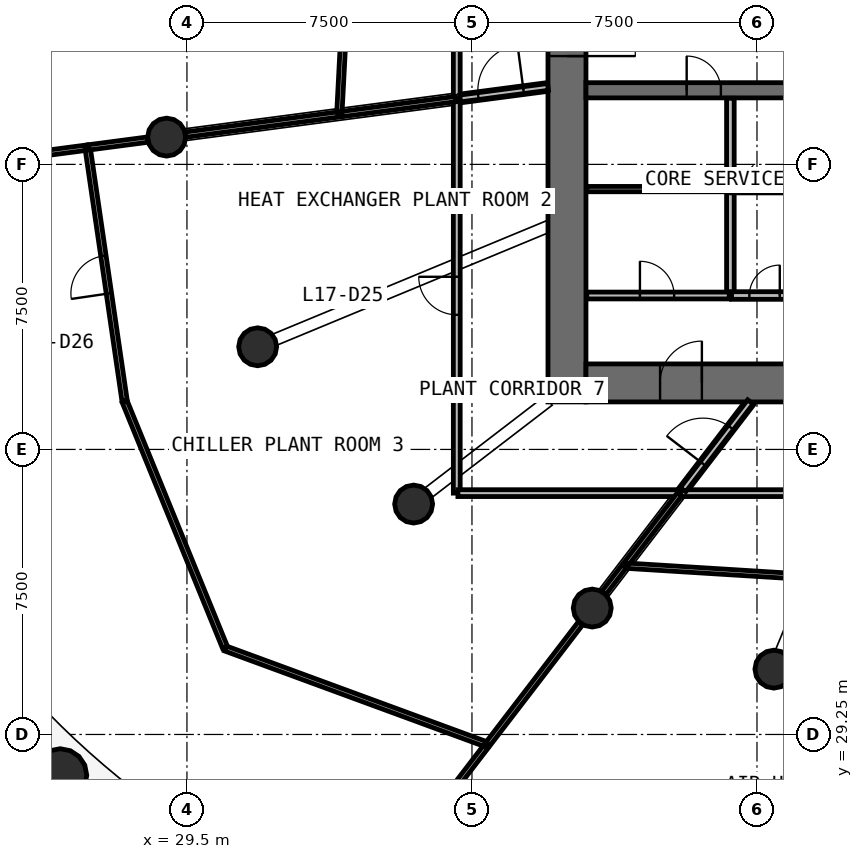
"""IFC4 building model, lengths in metres.
Left out: names, types, materials, properties, quantities, classifications, styles, units other than length and angle.
Written with IfcOpenShell. Run it as: python <this file> out.ifc"""

import sys

from ifc_helpers import new_model, si_unit, direction, frame, frame_2d, origin, origin_2d, place, context, subcontext, project, spatial, rectangle, circle, extrude, source, transform, mapped, element, fill, save


model = new_model("IFC4")
c1 = context("Model", 3, precision=1e-05, world=origin(), true_north=direction((0.0, 1.0)))
c2 = subcontext(c1, "Body", "Model", "MODEL_VIEW")
j1 = project(units=[si_unit("LENGTHUNIT", "METRE"), si_unit("PLANEANGLEUNIT", "RADIAN")], contexts=[c1])
p1 = place(None, origin())
s1 = spatial("IfcSite", under=j1, at=p1, CompositionType="ELEMENT")
p2 = place(p1, origin())
s2 = spatial("IfcBuilding", under=s1, at=p2, CompositionType="ELEMENT")
p3 = place(p2, frame((0.0, 0.0, 75.4)))
s3 = spatial("IfcBuildingStorey", under=s2, at=p3, CompositionType="ELEMENT", Elevation=75.4)
p4 = place(p3, frame((39.5, 58.0, 0.0), z_axis=(0.0, 0.0, 1.0), x_axis=(0.0, -1.0, 0.0)))
e1 = element("IfcWall", 1, at=p4, inside=s3, PredefinedType="SHEAR", context=c2, shape_type="SweptSolid", body=[
    extrude(rectangle(XDim=20.0, YDim=1.0, at=frame_2d((10.0, 0.0))), origin(), (0.0, 0.0, 1.0), 4.4),
])
p5 = place(p4, frame((9.1, 0.0, 0.0)))
e2 = element("IfcOpeningElement", 2, at=p5, cuts=e1, PredefinedType="OPENING", context=c2, shape_type="SweptSolid", body=[
    extrude(rectangle(XDim=1.8, YDim=2.1, at=frame_2d((0.9, 1.05))), frame((0.0, 0.51, 0.0), z_axis=(0.0, -1.0, 0.0), x_axis=(1.0, 0.0, 0.0)), (0.0, 0.0, 1.0), 1.02),
])
p6 = place(p3, frame((40.0, 38.5, 0.0), z_axis=(0.0, 0.0, 1.0), x_axis=(1.0, 0.0, 0.0)))
e3 = element("IfcWall", 3, at=p6, inside=s3, PredefinedType="SHEAR", context=c2, shape_type="SweptSolid", body=[
    extrude(rectangle(XDim=24.0, YDim=1.0, at=frame_2d((12.0, 0.0))), origin(), (0.0, 0.0, 1.0), 4.4),
])
p7 = place(p6, frame((21.45, 0.0, 0.0)))
e4 = element("IfcOpeningElement", 4, at=p7, cuts=e3, PredefinedType="OPENING", context=c2, shape_type="SweptSolid", body=[
    extrude(rectangle(XDim=1.1, YDim=2.1, at=frame_2d((0.55, 1.05))), frame((0.0, 0.51, 0.0), z_axis=(0.0, -1.0, 0.0), x_axis=(1.0, 0.0, 0.0)), (0.0, 0.0, 1.0), 1.02),
])
p8 = place(p6, frame((1.95, 0.0, 0.0)))
e5 = element("IfcOpeningElement", 5, at=p8, cuts=e3, PredefinedType="OPENING", context=c2, shape_type="SweptSolid", body=[
    extrude(rectangle(XDim=1.1, YDim=2.1, at=frame_2d((0.55, 1.05))), frame((0.0, 0.51, 0.0), z_axis=(0.0, -1.0, 0.0), x_axis=(1.0, 0.0, 0.0)), (0.0, 0.0, 1.0), 1.02),
])
p9 = place(p3, frame((40.0, 46.2, 0.0), z_axis=(0.0, 0.0, 1.0), x_axis=(1.0, 0.0, 0.0)))
e6 = element("IfcWall", 6, at=p9, inside=s3, PredefinedType="SHEAR", context=c2, shape_type="SweptSolid", body=[
    extrude(rectangle(XDim=24.0, YDim=0.4, at=frame_2d((12.0, 0.0))), origin(), (0.0, 0.0, 1.0), 4.4),
])
p10 = place(p9, frame((20.45, 0.0, 0.0)))
e7 = element("IfcOpeningElement", 7, at=p10, cuts=e6, PredefinedType="OPENING", context=c2, shape_type="SweptSolid", body=[
    extrude(rectangle(XDim=0.9, YDim=2.1, at=frame_2d((0.45, 1.05))), frame((0.0, 0.21, 0.0), z_axis=(0.0, -1.0, 0.0), x_axis=(1.0, 0.0, 0.0)), (0.0, 0.0, 1.0), 0.42),
])
p11 = place(p9, frame((2.65, 0.0, 0.0)))
e8 = element("IfcOpeningElement", 8, at=p11, cuts=e6, PredefinedType="OPENING", context=c2, shape_type="SweptSolid", body=[
    extrude(rectangle(XDim=0.9, YDim=2.1, at=frame_2d((0.45, 1.05))), frame((0.0, 0.21, 0.0), z_axis=(0.0, -1.0, 0.0), x_axis=(1.0, 0.0, 0.0)), (0.0, 0.0, 1.0), 0.42),
])
p12 = place(p9, frame((11.65, 0.0, 0.0)))
e9 = element("IfcOpeningElement", 9, at=p12, cuts=e6, PredefinedType="OPENING", context=c2, shape_type="SweptSolid", body=[
    extrude(rectangle(XDim=0.9, YDim=2.1, at=frame_2d((0.45, 1.05))), frame((0.0, 0.21, 0.0), z_axis=(0.0, -1.0, 0.0), x_axis=(1.0, 0.0, 0.0)), (0.0, 0.0, 1.0), 0.42),
])
m1 = source(origin(), c2, "Body", "SweptSolid", [
    extrude(circle(Radius=0.7, at=origin_2d()), origin(), (0.0, 0.0, 1.0), 4.0),
])
p13 = place(p3, frame((26.164, 28.176, 0.0), z_axis=(0.0, 0.0, 1.0), x_axis=(1.0, 0.0, 0.0)))
e10 = element("IfcColumn", 10, at=p13, inside=s3, PredefinedType="COLUMN", context=c2, shape_type="MappedRepresentation", body=[
    mapped(m1, transform((0.0, 0.0, 0.0), scale=1.0)),
])
m2 = source(origin(), c2, "Body", "SweptSolid", [
    extrude(circle(Radius=0.5, at=origin_2d()), origin(), (0.0, 0.0, 1.0), 4.4),
])
for number, where, z_axis, x_axis in (
    (11, (28.966, 44.968, 0.0), (0.0, 0.0, 1.0), (1.0, 0.0, 0.0)),
    (12, (31.361, 39.451, 0.0), (0.0, 0.0, 1.0), (1.0, 0.0, 0.0)),
    (13, (35.465, 35.312, 0.0), (0.0, 0.0, 1.0), (1.0, 0.0, 0.0)),
    (14, (40.165, 32.576, 0.0), (0.0, 0.0, 1.0), (1.0, 0.0, 0.0)),
    (15, (44.945, 30.969, 0.0), (0.0, 0.0, 1.0), (1.0, 0.0, 0.0)),
):
    element("IfcColumn", number, at=place(p3, frame(where, z_axis=z_axis, x_axis=x_axis)), inside=s3, PredefinedType="COLUMN", context=c2, shape_type="MappedRepresentation", body=[
        mapped(m2, transform((0.0, 0.0, 0.0), scale=1.0)),
    ])
p14 = place(p3, frame((43.8, 43.6, 0.0), z_axis=(0.0, 0.0, 1.0), x_axis=(0.0, -1.0, 0.0)))
e16 = element("IfcWall", 16, at=p14, inside=s3, PredefinedType="SOLIDWALL", context=c2, shape_type="SweptSolid", body=[
    extrude(rectangle(XDim=2.8, YDim=0.2, at=frame_2d((1.4, 0.0))), origin(), (0.0, 0.0, 1.0), 4.0),
])
p15 = place(p3, frame((43.8, 45.99, 0.0), z_axis=(0.0, 0.0, 1.0), x_axis=(0.0, -1.0, 0.0)))
e17 = element("IfcWall", 17, at=p15, inside=s3, PredefinedType="SOLIDWALL", context=c2, shape_type="SweptSolid", body=[
    extrude(rectangle(XDim=2.36, YDim=0.2, at=frame_2d((1.18, 0.0))), origin(), (0.0, 0.0, 1.0), 4.0),
])
p16 = place(p3, frame((43.83, 43.6, 0.0), z_axis=(0.0, 0.0, 1.0), x_axis=(1.0, 0.0, 0.0)))
e18 = element("IfcWall", 18, at=p16, inside=s3, PredefinedType="SOLIDWALL", context=c2, shape_type="SweptSolid", body=[
    extrude(rectangle(XDim=1.64, YDim=0.2, at=frame_2d((0.82, 0.0))), origin(), (0.0, 0.0, 1.0), 4.0),
])
p17 = place(p3, frame((43.83, 40.8, 0.0), z_axis=(0.0, 0.0, 1.0), x_axis=(1.0, 0.0, 0.0)))
e19 = element("IfcWall", 19, at=p17, inside=s3, PredefinedType="SOLIDWALL", context=c2, shape_type="SweptSolid", body=[
    extrude(rectangle(XDim=1.64, YDim=0.2, at=frame_2d((0.82, 0.0))), origin(), (0.0, 0.0, 1.0), 4.0),
])
p18 = place(p17, frame((0.47, 0.0, 0.0)))
e20 = element("IfcOpeningElement", 20, at=p18, cuts=e19, PredefinedType="OPENING", context=c2, shape_type="SweptSolid", body=[
    extrude(rectangle(XDim=0.8, YDim=2.1, at=frame_2d((0.4, 1.05))), frame((0.0, 0.11, 0.0), z_axis=(0.0, -1.0, 0.0), x_axis=(1.0, 0.0, 0.0)), (0.0, 0.0, 1.0), 0.22),
])
p19 = place(p3, frame((36.6, 45.973, 0.0), z_axis=(0.0, 0.0, 1.0), x_axis=(0.0, 1.0, 0.0)))
e21 = element("IfcWall", 21, at=p19, inside=s3, PredefinedType="PARTITIONING", context=c2, shape_type="SweptSolid", body=[
    extrude(rectangle(XDim=13.24, YDim=0.18, at=frame_2d((6.62, 0.0))), origin(), (0.0, 0.0, 1.0), 2.8),
])
p20 = place(p19, frame((6.19, 0.0, 0.0)))
e22 = element("IfcOpeningElement", 22, at=p20, cuts=e21, PredefinedType="OPENING", context=c2, shape_type="SweptSolid", body=[
    extrude(rectangle(XDim=1.0, YDim=2.1, at=frame_2d((0.5, 1.05))), frame((0.0, 0.1, 0.0), z_axis=(0.0, -1.0, 0.0), x_axis=(1.0, 0.0, 0.0)), (0.0, 0.0, 1.0), 0.2),
])
p21 = place(p3, frame((53.603, 35.6, 0.0), z_axis=(0.0, 0.0, 1.0), x_axis=(-1.0, 0.0, 0.0)))
e23 = element("IfcWall", 23, at=p21, inside=s3, PredefinedType="PARTITIONING", context=c2, shape_type="SweptSolid", body=[
    extrude(rectangle(XDim=11.117, YDim=0.18, at=frame_2d((5.559, 0.0))), origin(), (0.0, 0.0, 1.0), 2.8),
])
p22 = place(p21, frame((5.067, 0.0, 0.0)))
e24 = element("IfcOpeningElement", 24, at=p22, cuts=e23, PredefinedType="OPENING", context=c2, shape_type="SweptSolid", body=[
    extrude(rectangle(XDim=1.0, YDim=2.1, at=frame_2d((0.5, 1.05))), frame((0.0, 0.1, 0.0), z_axis=(0.0, -1.0, 0.0), x_axis=(1.0, 0.0, 0.0)), (0.0, 0.0, 1.0), 0.2),
])
p23 = place(p3, frame((36.6, 35.6, 0.0), z_axis=(0.0, 0.0, 1.0), x_axis=(0.0, 1.0, 0.0)))
e25 = element("IfcWall", 25, at=p23, inside=s3, PredefinedType="PARTITIONING", context=c2, shape_type="SweptSolid", body=[
    extrude(rectangle(XDim=10.343, YDim=0.18, at=frame_2d((5.171, 0.0))), origin(), (0.0, 0.0, 1.0), 2.8),
])
p24 = place(p23, frame((4.693, 0.0, 0.0)))
e26 = element("IfcOpeningElement", 26, at=p24, cuts=e25, PredefinedType="OPENING", context=c2, shape_type="SweptSolid", body=[
    extrude(rectangle(XDim=1.0, YDim=2.1, at=frame_2d((0.5, 1.05))), frame((0.0, 0.1, 0.0), z_axis=(0.0, -1.0, 0.0), x_axis=(1.0, 0.0, 0.0)), (0.0, 0.0, 1.0), 0.2),
])
p25 = place(p3, frame((36.63, 35.6, 0.0), z_axis=(0.0, 0.0, 1.0), x_axis=(1.0, 0.0, 0.0)))
e27 = element("IfcWall", 27, at=p25, inside=s3, PredefinedType="PARTITIONING", context=c2, shape_type="SweptSolid", body=[
    extrude(rectangle(XDim=5.825, YDim=0.18, at=frame_2d((2.913, 0.0))), origin(), (0.0, 0.0, 1.0), 2.8),
])
p26 = place(p3, frame((40.02, 40.8, 0.0), z_axis=(0.0, 0.0, 1.0), x_axis=(1.0, 0.0, 0.0)))
e28 = element("IfcWall", 28, at=p26, inside=s3, PredefinedType="PARTITIONING", context=c2, shape_type="SweptSolid", body=[
    extrude(rectangle(XDim=3.75, YDim=0.18, at=frame_2d((1.875, 0.0))), origin(), (0.0, 0.0, 1.0), 4.0),
])
p27 = place(p26, frame((1.4, 0.0, 0.0)))
e29 = element("IfcOpeningElement", 29, at=p27, cuts=e28, PredefinedType="OPENING", context=c2, shape_type="SweptSolid", body=[
    extrude(rectangle(XDim=0.9, YDim=2.1, at=frame_2d((0.45, 1.05))), frame((0.0, 0.1, 0.0), z_axis=(0.0, -1.0, 0.0), x_axis=(1.0, 0.0, 0.0)), (0.0, 0.0, 1.0), 0.2),
])
p28 = place(p3, frame((42.554, 35.69, 0.0), z_axis=(0.0, 0.0, 1.0), x_axis=(0.608737787706, 0.793371480341, 0.0)))
e30 = element("IfcWall", 30, at=p28, inside=s3, PredefinedType="PARTITIONING", context=c2, shape_type="SweptSolid", body=[
    extrude(rectangle(XDim=2.912, YDim=0.18, at=frame_2d((1.456, 0.0))), origin(), (0.0, 0.0, 1.0), 2.8),
])
p29 = place(p28, frame((0.862, 0.0, 0.0)))
e31 = element("IfcOpeningElement", 31, at=p29, cuts=e30, PredefinedType="OPENING", context=c2, shape_type="SweptSolid", body=[
    extrude(rectangle(XDim=1.2, YDim=2.1, at=frame_2d((0.6, 1.05))), frame((0.0, 0.1, 0.0), z_axis=(0.0, -1.0, 0.0), x_axis=(1.0, 0.0, 0.0)), (0.0, 0.0, 1.0), 0.2),
])
p30 = place(p3, frame((36.69, 45.984, 0.0), z_axis=(0.0, 0.0, 1.0), x_axis=(0.991440737811, 0.130557509967, 0.0)))
e32 = element("IfcWall", 32, at=p30, inside=s3, PredefinedType="PARTITIONING", context=c2, shape_type="SweptSolid", body=[
    extrude(rectangle(XDim=2.33, YDim=0.18, at=frame_2d((1.165, 0.0))), origin(), (0.0, 0.0, 1.0), 2.8),
])
p31 = place(p30, frame((0.48, 0.0, 0.0)))
e33 = element("IfcOpeningElement", 33, at=p31, cuts=e32, PredefinedType="OPENING", context=c2, shape_type="SweptSolid", body=[
    extrude(rectangle(XDim=1.2, YDim=2.1, at=frame_2d((0.6, 1.05))), frame((0.0, 0.1, 0.0), z_axis=(0.0, -1.0, 0.0), x_axis=(1.0, 0.0, 0.0)), (0.0, 0.0, 1.0), 0.2),
])
p32 = place(p3, frame((26.885, 44.694, 0.0), z_axis=(0.0, 0.0, 1.0), x_axis=(-0.991445064554, -0.130524648905, 0.0)))
e34 = element("IfcWall", 34, at=p32, inside=s3, PredefinedType="PARTITIONING", context=c2, shape_type="SweptSolid", body=[
    extrude(rectangle(XDim=10.265, YDim=0.14, at=frame_2d((5.133, 0.0))), origin(), (0.0, 0.0, 1.0), 2.8),
])
p33 = place(p3, frame((30.513, 31.513, 0.0), z_axis=(0.0, 0.0, 1.0), x_axis=(0.938632857677, -0.344917901085, 0.0)))
e35 = element("IfcWall", 35, at=p33, inside=s3, PredefinedType="PARTITIONING", context=c2, shape_type="SweptSolid", body=[
    extrude(rectangle(XDim=7.343, YDim=0.14, at=frame_2d((3.671, 0.0))), origin(), (0.0, 0.0, 1.0), 2.8),
])
p34 = place(p3, frame((27.864, 38.002, 0.0), z_axis=(0.0, 0.0, 1.0), x_axis=(0.377966751533, -0.925819169566, 0.0)))
e36 = element("IfcWall", 36, at=p34, inside=s3, PredefinedType="PARTITIONING", context=c2, shape_type="SweptSolid", body=[
    extrude(rectangle(XDim=6.98, YDim=0.14, at=frame_2d((3.49, 0.0))), origin(), (0.0, 0.0, 1.0), 2.8),
])
p35 = place(p3, frame((27.859, 38.032, 0.0), z_axis=(0.0, 0.0, 1.0), x_axis=(-0.144720027083, 0.989472644271, 0.0)))
e37 = element("IfcWall", 37, at=p35, inside=s3, PredefinedType="PARTITIONING", context=c2, shape_type="SweptSolid", body=[
    extrude(rectangle(XDim=6.702, YDim=0.14, at=frame_2d((3.351, 0.0))), origin(), (0.0, 0.0, 1.0), 2.8),
])
p36 = place(p35, frame((2.852, 0.0, 0.0)))
e38 = element("IfcOpeningElement", 38, at=p36, cuts=e37, PredefinedType="OPENING", context=c2, shape_type="SweptSolid", body=[
    extrude(rectangle(XDim=1.0, YDim=2.1, at=frame_2d((0.5, 1.05))), frame((0.0, 0.08, 0.0), z_axis=(0.0, -1.0, 0.0), x_axis=(1.0, 0.0, 0.0)), (0.0, 0.0, 1.0), 0.16),
])
p37 = place(p3, frame((37.361, 28.922, 0.0), z_axis=(0.0, 0.0, 1.0), x_axis=(-0.608768603858, -0.793347834784, 0.0)))
e39 = element("IfcWall", 39, at=p37, inside=s3, PredefinedType="PARTITIONING", context=c2, shape_type="SweptSolid", body=[
    extrude(rectangle(XDim=5.625, YDim=0.14, at=frame_2d((2.813, 0.0))), origin(), (0.0, 0.0, 1.0), 2.8),
])
p38 = place(p3, frame((41.022, 33.694, 0.0), z_axis=(0.0, 0.0, 1.0), x_axis=(0.998082686061, -0.061894683005, 0.0)))
e40 = element("IfcWall", 40, at=p38, inside=s3, PredefinedType="PARTITIONING", context=c2, shape_type="SweptSolid", body=[
    extrude(rectangle(XDim=4.935, YDim=0.14, at=frame_2d((2.467, 0.0))), origin(), (0.0, 0.0, 1.0), 2.8),
])
p39 = place(p3, frame((33.509, 45.566, 0.0), z_axis=(0.0, 0.0, 1.0), x_axis=(0.052002293209, 0.998646965399, 0.0)))
e41 = element("IfcWall", 41, at=p39, inside=s3, PredefinedType="PARTITIONING", context=c2, shape_type="SweptSolid", body=[
    extrude(rectangle(XDim=4.812, YDim=0.14, at=frame_2d((2.406, 0.0))), origin(), (0.0, 0.0, 1.0), 2.8),
])
p40 = place(p39, frame((1.962, 0.0, 0.0)))
e42 = element("IfcOpeningElement", 42, at=p40, cuts=e41, PredefinedType="OPENING", context=c2, shape_type="SweptSolid", body=[
    extrude(rectangle(XDim=1.0, YDim=2.1, at=frame_2d((0.5, 1.05))), frame((0.0, 0.08, 0.0), z_axis=(0.0, -1.0, 0.0), x_axis=(1.0, 0.0, 0.0)), (0.0, 0.0, 1.0), 0.16),
])
p41 = place(p3, frame((33.479, 45.562, 0.0), z_axis=(0.0, 0.0, 1.0), x_axis=(-0.991444643615, -0.130527846248, 0.0)))
e43 = element("IfcWall", 43, at=p41, inside=s3, PredefinedType="PARTITIONING", context=c2, shape_type="SweptSolid", body=[
    extrude(rectangle(XDim=4.048, YDim=0.14, at=frame_2d((2.024, 0.0))), origin(), (0.0, 0.0, 1.0), 2.8),
])
p42 = place(p3, frame((39.858, 32.176, 0.0), z_axis=(0.0, 0.0, 1.0), x_axis=(-0.608766057901, -0.793349788396, 0.0)))
e44 = element("IfcWall", 44, at=p42, inside=s3, PredefinedType="PARTITIONING", context=c2, shape_type="SweptSolid", body=[
    extrude(rectangle(XDim=3.998, YDim=0.14, at=frame_2d((1.999, 0.0))), origin(), (0.0, 0.0, 1.0), 2.8),
])
p43 = place(p3, frame((43.77, 43.6, 0.0), z_axis=(0.0, 0.0, 1.0), x_axis=(-1.0, 0.0, 0.0)))
e45 = element("IfcWall", 45, at=p43, inside=s3, PredefinedType="PARTITIONING", context=c2, shape_type="SweptSolid", body=[
    extrude(rectangle(XDim=3.75, YDim=0.14, at=frame_2d((1.875, 0.0))), origin(), (0.0, 0.0, 1.0), 3.1),
])
p44 = place(p3, frame((36.57, 45.969, 0.0), z_axis=(0.0, 0.0, 1.0), x_axis=(-0.991452642606, -0.130467074276, 0.0)))
e46 = element("IfcWall", 46, at=p44, inside=s3, PredefinedType="PARTITIONING", context=c2, shape_type="SweptSolid", body=[
    extrude(rectangle(XDim=3.017, YDim=0.14, at=frame_2d((1.508, 0.0))), origin(), (0.0, 0.0, 1.0), 2.8),
])
p45 = place(p3, frame((42.463, 35.571, 0.0), z_axis=(0.0, 0.0, 1.0), x_axis=(-0.608779636854, -0.793339368589, 0.0)))
e47 = element("IfcWall", 47, at=p45, inside=s3, PredefinedType="PARTITIONING", context=c2, shape_type="SweptSolid", body=[
    extrude(rectangle(XDim=2.282, YDim=0.14, at=frame_2d((1.141, 0.0))), origin(), (0.0, 0.0, 1.0), 2.8),
])
p46 = place(p3, frame((28.466, 44.902, 0.0), z_axis=(0.0, 0.0, 1.0), x_axis=(-0.991455357704, -0.130446439887, 0.0)))
e48 = element("IfcWall", 48, at=p46, inside=s3, PredefinedType="PARTITIONING", context=c2, shape_type="SweptSolid", body=[
    extrude(rectangle(XDim=1.565, YDim=0.14, at=frame_2d((0.782, 0.0))), origin(), (0.0, 0.0, 1.0), 2.8),
])
p47 = place(p3, frame((41.004, 33.67, 0.0), z_axis=(0.0, 0.0, 1.0), x_axis=(-0.60876565208, -0.793350099797, 0.0)))
e49 = element("IfcWall", 49, at=p47, inside=s3, PredefinedType="PARTITIONING", context=c2, shape_type="SweptSolid", body=[
    extrude(rectangle(XDim=0.874, YDim=0.14, at=frame_2d((0.437, 0.0))), origin(), (0.0, 0.0, 1.0), 2.8),
])
m3 = source(origin(), c2, "Body", "SweptSolid", [
    extrude(rectangle(XDim=1.8, YDim=2.1, at=frame_2d((0.9, 1.05))), frame((0.0, 0.025, 0.0), z_axis=(0.0, -1.0, 0.0), x_axis=(1.0, 0.0, 0.0)), (0.0, 0.0, 1.0), 0.05),
])
p48 = place(p5, origin())
e50 = element("IfcDoor", 50, at=p48, inside=s3, OperationType="SINGLE_SWING_RIGHT", PredefinedType="DOOR", context=c2, shape_type="MappedRepresentation", body=[
    mapped(m3, transform((0.0, 0.0, 0.0), scale=1.0)),
])
fill(e2, e50)
m4 = source(origin(), c2, "Body", "SweptSolid", [
    extrude(rectangle(XDim=0.8, YDim=2.1, at=frame_2d((0.4, 1.05))), frame((0.0, 0.025, 0.0), z_axis=(0.0, -1.0, 0.0), x_axis=(1.0, 0.0, 0.0)), (0.0, 0.0, 1.0), 0.05),
])
p49 = place(p18, origin())
e51 = element("IfcDoor", 51, at=p49, inside=s3, OperationType="SINGLE_SWING_RIGHT", PredefinedType="DOOR", context=c2, shape_type="MappedRepresentation", body=[
    mapped(m4, transform((0.0, 0.0, 0.0), scale=1.0)),
])
fill(e20, e51)
m5 = source(origin(), c2, "Body", "SweptSolid", [
    extrude(rectangle(XDim=1.1, YDim=2.1, at=frame_2d((0.55, 1.05))), frame((0.0, 0.025, 0.0), z_axis=(0.0, -1.0, 0.0), x_axis=(1.0, 0.0, 0.0)), (0.0, 0.0, 1.0), 0.05),
])
p50 = place(p8, origin())
e52 = element("IfcDoor", 52, at=p50, inside=s3, OperationType="SINGLE_SWING_RIGHT", PredefinedType="DOOR", context=c2, shape_type="MappedRepresentation", body=[
    mapped(m5, transform((0.0, 0.0, 0.0), scale=1.0)),
])
fill(e5, e52)
m6 = source(origin(), c2, "Body", "SweptSolid", [
    extrude(rectangle(XDim=1.0, YDim=2.1, at=frame_2d((0.5, 1.05))), frame((0.0, 0.025, 0.0), z_axis=(0.0, -1.0, 0.0), x_axis=(1.0, 0.0, 0.0)), (0.0, 0.0, 1.0), 0.05),
])
p51 = place(p24, origin())
e53 = element("IfcDoor", 53, at=p51, inside=s3, OperationType="SINGLE_SWING_RIGHT", PredefinedType="DOOR", context=c2, shape_type="MappedRepresentation", body=[
    mapped(m6, transform((0.0, 0.0, 0.0), scale=1.0)),
])
fill(e26, e53)
p52 = place(p36, origin())
e54 = element("IfcDoor", 54, at=p52, inside=s3, OperationType="SINGLE_SWING_LEFT", PredefinedType="DOOR", context=c2, shape_type="MappedRepresentation", body=[
    mapped(m6, transform((0.0, 0.0, 0.0), scale=1.0)),
])
fill(e38, e54)
m7 = source(origin(), c2, "Body", "SweptSolid", [
    extrude(rectangle(XDim=1.2, YDim=2.1, at=frame_2d((0.6, 1.05))), frame((0.0, 0.025, 0.0), z_axis=(0.0, -1.0, 0.0), x_axis=(1.0, 0.0, 0.0)), (0.0, 0.0, 1.0), 0.05),
])
p53 = place(p31, origin())
e55 = element("IfcDoor", 55, at=p53, inside=s3, OperationType="SINGLE_SWING_RIGHT", PredefinedType="DOOR", context=c2, shape_type="MappedRepresentation", body=[
    mapped(m7, transform((0.0, 0.0, 0.0), scale=1.0)),
])
fill(e33, e55)
p54 = place(p29, origin())
e56 = element("IfcDoor", 56, at=p54, inside=s3, OperationType="SINGLE_SWING_LEFT", PredefinedType="DOOR", context=c2, shape_type="MappedRepresentation", body=[
    mapped(m7, transform((0.0, 0.0, 0.0), scale=1.0)),
])
fill(e31, e56)
m8 = source(origin(), c2, "Body", "SweptSolid", [
    extrude(rectangle(XDim=0.9, YDim=2.1, at=frame_2d((0.45, 1.05))), frame((0.0, 0.025, 0.0), z_axis=(0.0, -1.0, 0.0), x_axis=(1.0, 0.0, 0.0)), (0.0, 0.0, 1.0), 0.05),
])
p55 = place(p27, origin())
e57 = element("IfcDoor", 57, at=p55, inside=s3, OperationType="SINGLE_SWING_LEFT", PredefinedType="DOOR", context=c2, shape_type="MappedRepresentation", body=[
    mapped(m8, transform((0.0, 0.0, 0.0), scale=1.0)),
])
fill(e29, e57)
p56 = place(p11, origin())
e58 = element("IfcDoor", 58, at=p56, inside=s3, OperationType="SINGLE_SWING_LEFT", PredefinedType="DOOR", context=c2, shape_type="MappedRepresentation", body=[
    mapped(m8, transform((0.0, 0.0, 0.0), scale=1.0)),
])
fill(e8, e58)
save(model, sys.argv[1])
